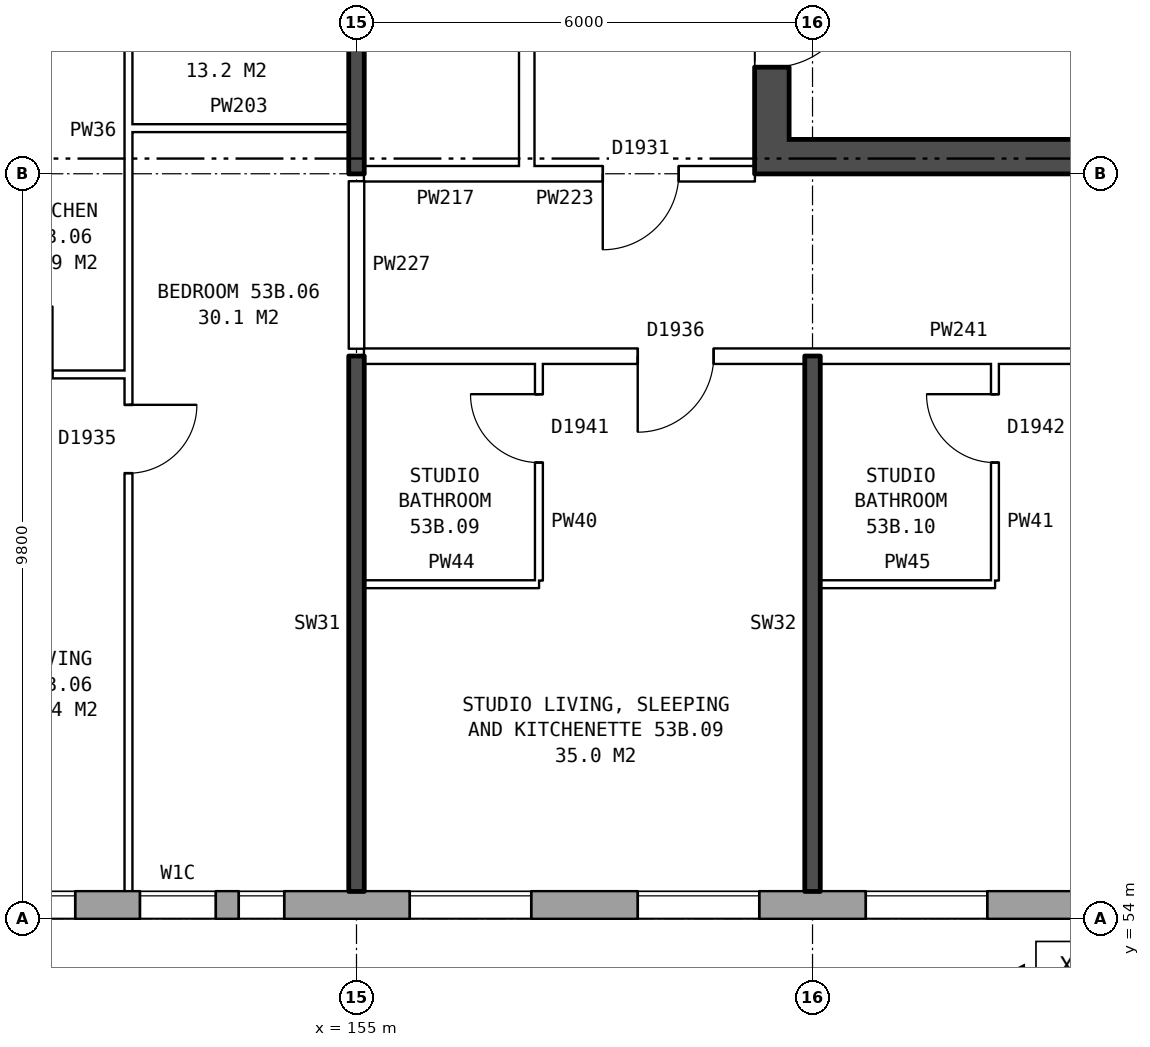
"""IFC4 building model, lengths in metres.
Left out: names, types, materials, properties, quantities, classifications, styles, units other than length and angle.
Written with IfcOpenShell. Run it as: python <this file> out.ifc"""

import sys

from ifc_helpers import new_model, si_unit, direction, frame, frame_2d, origin, place, context, subcontext, project, spatial, rectangle, extrude, element, fill, save


model = new_model("IFC4")
c1 = context("Model", 3, precision=1e-05, world=origin(), true_north=direction((0.0, 1.0)))
c2 = subcontext(c1, "Body", "Model", "MODEL_VIEW")
j1 = project(units=[si_unit("LENGTHUNIT", "METRE"), si_unit("PLANEANGLEUNIT", "RADIAN")], contexts=[c1])
p1 = place(None, origin())
s1 = spatial("IfcSite", under=j1, at=p1, CompositionType="ELEMENT")
p2 = place(p1, origin())
s2 = spatial("IfcBuilding", under=s1, at=p2, CompositionType="ELEMENT")
p3 = place(p2, frame((0.0, 0.0, 188.2)))
s3 = spatial("IfcBuildingStorey", under=s2, at=p3, CompositionType="ELEMENT", Elevation=188.2)
p4 = place(p3, frame((134.075, 54.18, 0.0), z_axis=(0.0, 0.0, 1.0), x_axis=(1.0, 0.0, 0.0)))
e1 = element("IfcWall", 1, at=p4, inside=s3, PredefinedType="STANDARD", context=c2, shape_type="SweptSolid", body=[
    extrude(rectangle(XDim=33.101, YDim=0.36, at=frame_2d((16.55, 0.0))), origin(), (0.0, 0.0, 1.0), 2.85),
])
p5 = place(p4, frame((0.625, 0.0, 0.8)))
e2 = element("IfcOpeningElement", 2, at=p5, cuts=e1, PredefinedType="OPENING", context=c2, shape_type="SweptSolid", body=[
    extrude(rectangle(XDim=1.6, YDim=1.8, at=frame_2d((0.8, 0.9))), frame((0.0, 0.19, 0.0), z_axis=(0.0, -1.0, 0.0), x_axis=(1.0, 0.0, 0.0)), (0.0, 0.0, 1.0), 0.38),
])
p6 = place(p4, frame((3.625, 0.0, 0.8)))
e3 = element("IfcOpeningElement", 3, at=p6, cuts=e1, PredefinedType="OPENING", context=c2, shape_type="SweptSolid", body=[
    extrude(rectangle(XDim=1.6, YDim=1.8, at=frame_2d((0.8, 0.9))), frame((0.0, 0.19, 0.0), z_axis=(0.0, -1.0, 0.0), x_axis=(1.0, 0.0, 0.0)), (0.0, 0.0, 1.0), 0.38),
])
p7 = place(p4, frame((6.625, 0.0, 0.8)))
e4 = element("IfcOpeningElement", 4, at=p7, cuts=e1, PredefinedType="OPENING", context=c2, shape_type="SweptSolid", body=[
    extrude(rectangle(XDim=1.6, YDim=1.8, at=frame_2d((0.8, 0.9))), frame((0.0, 0.19, 0.0), z_axis=(0.0, -1.0, 0.0), x_axis=(1.0, 0.0, 0.0)), (0.0, 0.0, 1.0), 0.38),
])
p8 = place(p4, frame((9.625, 0.0, 0.8)))
e5 = element("IfcOpeningElement", 5, at=p8, cuts=e1, PredefinedType="OPENING", context=c2, shape_type="SweptSolid", body=[
    extrude(rectangle(XDim=1.6, YDim=1.8, at=frame_2d((0.8, 0.9))), frame((0.0, 0.19, 0.0), z_axis=(0.0, -1.0, 0.0), x_axis=(1.0, 0.0, 0.0)), (0.0, 0.0, 1.0), 0.38),
])
p9 = place(p4, frame((12.975, 0.0, 0.15)))
e6 = element("IfcOpeningElement", 6, at=p9, cuts=e1, PredefinedType="OPENING", context=c2, shape_type="SweptSolid", body=[
    extrude(rectangle(XDim=0.6, YDim=0.9, at=frame_2d((0.3, 0.45))), frame((0.0, 0.19, 0.0), z_axis=(0.0, -1.0, 0.0), x_axis=(1.0, 0.0, 0.0)), (0.0, 0.0, 1.0), 0.38),
])
p10 = place(p4, frame((15.625, 0.0, 0.8)))
e7 = element("IfcOpeningElement", 7, at=p10, cuts=e1, PredefinedType="OPENING", context=c2, shape_type="SweptSolid", body=[
    extrude(rectangle(XDim=1.6, YDim=1.8, at=frame_2d((0.8, 0.9))), frame((0.0, 0.19, 0.0), z_axis=(0.0, -1.0, 0.0), x_axis=(1.0, 0.0, 0.0)), (0.0, 0.0, 1.0), 0.38),
])
p11 = place(p4, frame((18.075, 0.0, 0.45)))
e8 = element("IfcOpeningElement", 8, at=p11, cuts=e1, PredefinedType="OPENING", context=c2, shape_type="SweptSolid", body=[
    extrude(rectangle(XDim=1.0, YDim=1.8, at=frame_2d((0.5, 0.9))), frame((0.0, 0.19, 0.0), z_axis=(0.0, -1.0, 0.0), x_axis=(1.0, 0.0, 0.0)), (0.0, 0.0, 1.0), 0.38),
])
p12 = place(p4, frame((21.625, 0.0, 0.8)))
e9 = element("IfcOpeningElement", 9, at=p12, cuts=e1, PredefinedType="OPENING", context=c2, shape_type="SweptSolid", body=[
    extrude(rectangle(XDim=1.6, YDim=1.8, at=frame_2d((0.8, 0.9))), frame((0.0, 0.19, 0.0), z_axis=(0.0, -1.0, 0.0), x_axis=(1.0, 0.0, 0.0)), (0.0, 0.0, 1.0), 0.38),
])
p13 = place(p4, frame((24.625, 0.0, 0.8)))
e10 = element("IfcOpeningElement", 10, at=p13, cuts=e1, PredefinedType="OPENING", context=c2, shape_type="SweptSolid", body=[
    extrude(rectangle(XDim=1.6, YDim=1.8, at=frame_2d((0.8, 0.9))), frame((0.0, 0.19, 0.0), z_axis=(0.0, -1.0, 0.0), x_axis=(1.0, 0.0, 0.0)), (0.0, 0.0, 1.0), 0.38),
])
p14 = place(p4, frame((27.625, 0.0, 0.8)))
e11 = element("IfcOpeningElement", 11, at=p14, cuts=e1, PredefinedType="OPENING", context=c2, shape_type="SweptSolid", body=[
    extrude(rectangle(XDim=1.6, YDim=1.8, at=frame_2d((0.8, 0.9))), frame((0.0, 0.19, 0.0), z_axis=(0.0, -1.0, 0.0), x_axis=(1.0, 0.0, 0.0)), (0.0, 0.0, 1.0), 0.38),
])
p15 = place(p4, frame((30.625, 0.0, 0.8)))
e12 = element("IfcOpeningElement", 12, at=p15, cuts=e1, PredefinedType="OPENING", context=c2, shape_type="SweptSolid", body=[
    extrude(rectangle(XDim=1.6, YDim=1.8, at=frame_2d((0.8, 0.9))), frame((0.0, 0.19, 0.0), z_axis=(0.0, -1.0, 0.0), x_axis=(1.0, 0.0, 0.0)), (0.0, 0.0, 1.0), 0.38),
])
p16 = place(p4, frame((13.875, 0.0, 0.25)))
e13 = element("IfcOpeningElement", 13, at=p16, cuts=e1, PredefinedType="OPENING", context=c2, shape_type="SweptSolid", body=[
    extrude(rectangle(XDim=0.8, YDim=1.8, at=frame_2d((0.4, 0.9))), frame((0.0, 0.19, 0.0), z_axis=(0.0, -1.0, 0.0), x_axis=(1.0, 0.0, 0.0)), (0.0, 0.0, 1.0), 0.38),
])
p17 = place(p4, frame((19.375, 0.0, 0.35)))
e14 = element("IfcOpeningElement", 14, at=p17, cuts=e1, PredefinedType="OPENING", context=c2, shape_type="SweptSolid", body=[
    extrude(rectangle(XDim=0.6, YDim=0.9, at=frame_2d((0.3, 0.45))), frame((0.0, 0.19, 0.0), z_axis=(0.0, -1.0, 0.0), x_axis=(1.0, 0.0, 0.0)), (0.0, 0.0, 1.0), 0.38),
])
p18 = place(p3, frame((160.465, 76.2, 0.0), z_axis=(0.0, 0.0, 1.0), x_axis=(0.0, -1.0, 0.0)))
e15 = element("IfcWall", 15, at=p18, inside=s3, PredefinedType="SHEAR", context=c2, shape_type="SweptSolid", body=[
    extrude(rectangle(XDim=12.4, YDim=0.45, at=frame_2d((6.2, 0.0))), origin(), (0.0, 0.0, 1.0), 2.85),
])
p19 = place(p18, frame((1.325, 0.0, 0.0)))
e16 = element("IfcOpeningElement", 16, at=p19, cuts=e15, PredefinedType="OPENING", context=c2, shape_type="SweptSolid", body=[
    extrude(rectangle(XDim=1.1, YDim=2.1, at=frame_2d((0.55, 1.05))), frame((0.0, 0.235, 0.0), z_axis=(0.0, -1.0, 0.0), x_axis=(1.0, 0.0, 0.0)), (0.0, 0.0, 1.0), 0.47),
])
p20 = place(p18, frame((3.825, 0.0, 0.0)))
e17 = element("IfcOpeningElement", 17, at=p20, cuts=e15, PredefinedType="OPENING", context=c2, shape_type="SweptSolid", body=[
    extrude(rectangle(XDim=0.85, YDim=2.1, at=frame_2d((0.425, 1.05))), frame((0.0, 0.235, 0.0), z_axis=(0.0, -1.0, 0.0), x_axis=(1.0, 0.0, 0.0)), (0.0, 0.0, 1.0), 0.47),
])
p21 = place(p18, frame((5.975, 0.0, 0.0)))
e18 = element("IfcOpeningElement", 18, at=p21, cuts=e15, PredefinedType="OPENING", context=c2, shape_type="SweptSolid", body=[
    extrude(rectangle(XDim=0.85, YDim=2.1, at=frame_2d((0.425, 1.05))), frame((0.0, 0.235, 0.0), z_axis=(0.0, -1.0, 0.0), x_axis=(1.0, 0.0, 0.0)), (0.0, 0.0, 1.0), 0.47),
])
p22 = place(p18, frame((9.9, 0.0, 0.0)))
e19 = element("IfcOpeningElement", 19, at=p22, cuts=e15, PredefinedType="OPENING", context=c2, shape_type="SweptSolid", body=[
    extrude(rectangle(XDim=1.1, YDim=2.1, at=frame_2d((0.55, 1.05))), frame((0.0, 0.235, 0.0), z_axis=(0.0, -1.0, 0.0), x_axis=(1.0, 0.0, 0.0)), (0.0, 0.0, 1.0), 0.47),
])
p23 = place(p18, frame((8.125, 0.0, 0.0)))
e20 = element("IfcOpeningElement", 20, at=p23, cuts=e15, PredefinedType="OPENING", context=c2, shape_type="SweptSolid", body=[
    extrude(rectangle(XDim=0.85, YDim=2.1, at=frame_2d((0.425, 1.05))), frame((0.0, 0.235, 0.0), z_axis=(0.0, -1.0, 0.0), x_axis=(1.0, 0.0, 0.0)), (0.0, 0.0, 1.0), 0.47),
])
p24 = place(p3, frame((160.69, 64.025, 0.0), z_axis=(0.0, 0.0, 1.0), x_axis=(1.0, 0.0, 0.0)))
e21 = element("IfcWall", 21, at=p24, inside=s3, PredefinedType="SHEAR", context=c2, shape_type="SweptSolid", body=[
    extrude(rectangle(XDim=7.5, YDim=0.45, at=frame_2d((3.75, 0.0))), origin(), (0.0, 0.0, 1.0), 2.85),
])
p25 = place(p3, frame((157.24, 63.9, 0.0), z_axis=(0.0, 0.0, 1.0), x_axis=(0.0, 1.0, 0.0)))
e22 = element("IfcWall", 22, at=p25, inside=s3, PredefinedType="PARTITIONING", context=c2, shape_type="SweptSolid", body=[
    extrude(rectangle(XDim=12.2, YDim=0.2, at=frame_2d((6.1, 0.0))), origin(), (0.0, 0.0, 1.0), 2.85),
])
p26 = place(p25, frame((5.1, 0.0, 0.0)))
e23 = element("IfcOpeningElement", 23, at=p26, cuts=e22, PredefinedType="OPENING", context=c2, shape_type="SweptSolid", body=[
    extrude(rectangle(XDim=2.0, YDim=2.1, at=frame_2d((1.0, 1.05))), frame((0.0, 0.11, 0.0), z_axis=(0.0, -1.0, 0.0), x_axis=(1.0, 0.0, 0.0)), (0.0, 0.0, 1.0), 0.22),
])
for number, where, z_axis, x_axis in (
    (24, (155.1, 58.4, 0.0), (0.0, 0.0, 1.0), (1.0, 0.0, 0.0)),
    (25, (161.1, 58.4, 0.0), (0.0, 0.0, 1.0), (1.0, 0.0, 0.0)),
):
    element("IfcWall", number, at=place(p3, frame(where, z_axis=z_axis, x_axis=x_axis)), inside=s3, PredefinedType="PARTITIONING", context=c2, shape_type="SweptSolid", body=[
        extrude(rectangle(XDim=2.3, YDim=0.1, at=frame_2d((1.15, 0.0))), origin(), (0.0, 0.0, 1.0), 2.85),
    ])
p27 = place(p3, frame((149.1, 61.16, 0.0), z_axis=(0.0, 0.0, 1.0), x_axis=(1.0, 0.0, 0.0)))
e26 = element("IfcWall", 26, at=p27, inside=s3, PredefinedType="PARTITIONING", context=c2, shape_type="SweptSolid", body=[
    extrude(rectangle(XDim=2.9, YDim=0.1, at=frame_2d((1.45, 0.0))), origin(), (0.0, 0.0, 1.0), 2.85),
])
p28 = place(p27, frame((1.0, 0.0, 0.0)))
e27 = element("IfcOpeningElement", 27, at=p28, cuts=e26, PredefinedType="OPENING", context=c2, shape_type="SweptSolid", body=[
    extrude(rectangle(XDim=0.9, YDim=2.1, at=frame_2d((0.45, 1.05))), frame((0.0, 0.06, 0.0), z_axis=(0.0, -1.0, 0.0), x_axis=(1.0, 0.0, 0.0)), (0.0, 0.0, 1.0), 0.12),
])
p29 = place(p3, frame((155.1, 61.4, 0.0), z_axis=(0.0, 0.0, 1.0), x_axis=(1.0, 0.0, 0.0)))
e28 = element("IfcWall", 28, at=p29, inside=s3, PredefinedType="PARTITIONING", context=c2, shape_type="SweptSolid", body=[
    extrude(rectangle(XDim=14.79, YDim=0.2, at=frame_2d((7.395, 0.0))), origin(), (0.0, 0.0, 1.0), 2.85),
])
p30 = place(p29, frame((3.6, 0.0, 0.0)))
e29 = element("IfcOpeningElement", 29, at=p30, cuts=e28, PredefinedType="OPENING", context=c2, shape_type="SweptSolid", body=[
    extrude(rectangle(XDim=1.0, YDim=2.1, at=frame_2d((0.5, 1.05))), frame((0.0, 0.11, 0.0), z_axis=(0.0, -1.0, 0.0), x_axis=(1.0, 0.0, 0.0)), (0.0, 0.0, 1.0), 0.22),
])
p31 = place(p29, frame((11.045, 0.0, 0.0)))
e30 = element("IfcOpeningElement", 30, at=p31, cuts=e28, PredefinedType="OPENING", context=c2, shape_type="SweptSolid", body=[
    extrude(rectangle(XDim=1.0, YDim=2.1, at=frame_2d((0.5, 1.05))), frame((0.0, 0.11, 0.0), z_axis=(0.0, -1.0, 0.0), x_axis=(1.0, 0.0, 0.0)), (0.0, 0.0, 1.0), 0.22),
])
p32 = place(p3, frame((155.1, 63.8, 0.0), z_axis=(0.0, 0.0, 1.0), x_axis=(1.0, 0.0, 0.0)))
e31 = element("IfcWall", 31, at=p32, inside=s3, PredefinedType="PARTITIONING", context=c2, shape_type="SweptSolid", body=[
    extrude(rectangle(XDim=2.14, YDim=0.2, at=frame_2d((1.07, 0.0))), origin(), (0.0, 0.0, 1.0), 2.85),
])
p33 = place(p3, frame((157.24, 63.8, 0.0), z_axis=(0.0, 0.0, 1.0), x_axis=(1.0, 0.0, 0.0)))
e32 = element("IfcWall", 32, at=p33, inside=s3, PredefinedType="PARTITIONING", context=c2, shape_type="SweptSolid", body=[
    extrude(rectangle(XDim=3.0, YDim=0.2, at=frame_2d((1.5, 0.0))), origin(), (0.0, 0.0, 1.0), 2.85),
])
p34 = place(p33, frame((1.0, 0.0, 0.0)))
e33 = element("IfcOpeningElement", 33, at=p34, cuts=e32, PredefinedType="OPENING", context=c2, shape_type="SweptSolid", body=[
    extrude(rectangle(XDim=1.0, YDim=2.1, at=frame_2d((0.5, 1.05))), frame((0.0, 0.11, 0.0), z_axis=(0.0, -1.0, 0.0), x_axis=(1.0, 0.0, 0.0)), (0.0, 0.0, 1.0), 0.22),
])
p35 = place(p3, frame((152.0, 64.4, 0.0), z_axis=(0.0, 0.0, 1.0), x_axis=(1.0, 0.0, 0.0)))
e34 = element("IfcWall", 34, at=p35, inside=s3, PredefinedType="PARTITIONING", context=c2, shape_type="SweptSolid", body=[
    extrude(rectangle(XDim=2.9, YDim=0.1, at=frame_2d((1.45, 0.0))), origin(), (0.0, 0.0, 1.0), 2.85),
])
p36 = place(p3, frame((152.0, 54.36, 0.0), z_axis=(0.0, 0.0, 1.0), x_axis=(0.0, 1.0, 0.0)))
e35 = element("IfcWall", 35, at=p36, inside=s3, PredefinedType="PARTITIONING", context=c2, shape_type="SweptSolid", body=[
    extrude(rectangle(XDim=14.34, YDim=0.1, at=frame_2d((7.17, 0.0))), origin(), (0.0, 0.0, 1.0), 2.85),
])
p37 = place(p36, frame((5.5, 0.0, 0.0)))
e36 = element("IfcOpeningElement", 36, at=p37, cuts=e35, PredefinedType="OPENING", context=c2, shape_type="SweptSolid", body=[
    extrude(rectangle(XDim=0.9, YDim=2.1, at=frame_2d((0.45, 1.05))), frame((0.0, 0.06, 0.0), z_axis=(0.0, -1.0, 0.0), x_axis=(1.0, 0.0, 0.0)), (0.0, 0.0, 1.0), 0.12),
])
p38 = place(p36, frame((13.04, 0.0, 0.0)))
e37 = element("IfcOpeningElement", 37, at=p38, cuts=e35, PredefinedType="OPENING", context=c2, shape_type="SweptSolid", body=[
    extrude(rectangle(XDim=0.9, YDim=2.1, at=frame_2d((0.45, 1.05))), frame((0.0, 0.06, 0.0), z_axis=(0.0, -1.0, 0.0), x_axis=(1.0, 0.0, 0.0)), (0.0, 0.0, 1.0), 0.12),
])
p39 = place(p3, frame((155.0, 54.36, 0.0), z_axis=(0.0, 0.0, 1.0), x_axis=(0.0, 1.0, 0.0)))
e38 = element("IfcWall", 38, at=p39, inside=s3, PredefinedType="SOLIDWALL", context=c2, shape_type="SweptSolid", body=[
    extrude(rectangle(XDim=7.04, YDim=0.2, at=frame_2d((3.52, 0.0))), origin(), (0.0, 0.0, 1.0), 2.85),
])
p40 = place(p3, frame((155.0, 61.5, 0.0), z_axis=(0.0, 0.0, 1.0), x_axis=(0.0, 1.0, 0.0)))
e39 = element("IfcWall", 39, at=p40, inside=s3, PredefinedType="PARTITIONING", context=c2, shape_type="SweptSolid", body=[
    extrude(rectangle(XDim=2.2, YDim=0.2, at=frame_2d((1.1, 0.0))), origin(), (0.0, 0.0, 1.0), 2.85),
])
p41 = place(p3, frame((155.0, 63.8, 0.0), z_axis=(0.0, 0.0, 1.0), x_axis=(0.0, 1.0, 0.0)))
e40 = element("IfcWall", 40, at=p41, inside=s3, PredefinedType="SOLIDWALL", context=c2, shape_type="SweptSolid", body=[
    extrude(rectangle(XDim=5.0, YDim=0.2, at=frame_2d((2.5, 0.0))), origin(), (0.0, 0.0, 1.0), 2.85),
])
p42 = place(p3, frame((157.4, 58.45, 0.0), z_axis=(0.0, 0.0, 1.0), x_axis=(0.0, 1.0, 0.0)))
e41 = element("IfcWall", 41, at=p42, inside=s3, PredefinedType="PARTITIONING", context=c2, shape_type="SweptSolid", body=[
    extrude(rectangle(XDim=2.85, YDim=0.1, at=frame_2d((1.425, 0.0))), origin(), (0.0, 0.0, 1.0), 2.85),
])
p43 = place(p42, frame((1.55, 0.0, 0.0)))
e42 = element("IfcOpeningElement", 42, at=p43, cuts=e41, PredefinedType="OPENING", context=c2, shape_type="SweptSolid", body=[
    extrude(rectangle(XDim=0.9, YDim=2.1, at=frame_2d((0.45, 1.05))), frame((0.0, 0.06, 0.0), z_axis=(0.0, -1.0, 0.0), x_axis=(1.0, 0.0, 0.0)), (0.0, 0.0, 1.0), 0.12),
])
p44 = place(p3, frame((161.0, 54.36, 0.0), z_axis=(0.0, 0.0, 1.0), x_axis=(0.0, 1.0, 0.0)))
e43 = element("IfcWall", 43, at=p44, inside=s3, PredefinedType="SOLIDWALL", context=c2, shape_type="SweptSolid", body=[
    extrude(rectangle(XDim=7.04, YDim=0.2, at=frame_2d((3.52, 0.0))), origin(), (0.0, 0.0, 1.0), 2.85),
])
p45 = place(p3, frame((163.4, 58.45, 0.0), z_axis=(0.0, 0.0, 1.0), x_axis=(0.0, 1.0, 0.0)))
e44 = element("IfcWall", 44, at=p45, inside=s3, PredefinedType="PARTITIONING", context=c2, shape_type="SweptSolid", body=[
    extrude(rectangle(XDim=2.85, YDim=0.1, at=frame_2d((1.425, 0.0))), origin(), (0.0, 0.0, 1.0), 2.85),
])
p46 = place(p45, frame((1.55, 0.0, 0.0)))
e45 = element("IfcOpeningElement", 45, at=p46, cuts=e44, PredefinedType="OPENING", context=c2, shape_type="SweptSolid", body=[
    extrude(rectangle(XDim=0.9, YDim=2.1, at=frame_2d((0.45, 1.05))), frame((0.0, 0.06, 0.0), z_axis=(0.0, -1.0, 0.0), x_axis=(1.0, 0.0, 0.0)), (0.0, 0.0, 1.0), 0.12),
])
p47 = place(p10, origin())
e46 = element("IfcWindow", 46, at=p47, inside=s3, PartitioningType="SINGLE_PANEL", PredefinedType="WINDOW", context=c2, shape_type="SweptSolid", body=[
    extrude(rectangle(XDim=1.6, YDim=1.8, at=frame_2d((0.8, 0.9))), frame((0.0, 0.15, 0.0), z_axis=(0.0, -1.0, 0.0), x_axis=(1.0, 0.0, 0.0)), (0.0, 0.0, 1.0), 0.06),
])
fill(e7, e46)
p48 = place(p11, origin())
e47 = element("IfcWindow", 47, at=p48, inside=s3, PartitioningType="SINGLE_PANEL", PredefinedType="WINDOW", context=c2, shape_type="SweptSolid", body=[
    extrude(rectangle(XDim=1.0, YDim=1.8, at=frame_2d((0.5, 0.9))), frame((0.0, 0.15, 0.0), z_axis=(0.0, -1.0, 0.0), x_axis=(1.0, 0.0, 0.0)), (0.0, 0.0, 1.0), 0.06),
])
fill(e8, e47)
p49 = place(p12, origin())
e48 = element("IfcWindow", 48, at=p49, inside=s3, PartitioningType="SINGLE_PANEL", PredefinedType="WINDOW", context=c2, shape_type="SweptSolid", body=[
    extrude(rectangle(XDim=1.6, YDim=1.8, at=frame_2d((0.8, 0.9))), frame((0.0, 0.15, 0.0), z_axis=(0.0, -1.0, 0.0), x_axis=(1.0, 0.0, 0.0)), (0.0, 0.0, 1.0), 0.06),
])
fill(e9, e48)
p50 = place(p13, origin())
e49 = element("IfcWindow", 49, at=p50, inside=s3, PartitioningType="SINGLE_PANEL", PredefinedType="WINDOW", context=c2, shape_type="SweptSolid", body=[
    extrude(rectangle(XDim=1.6, YDim=1.8, at=frame_2d((0.8, 0.9))), frame((0.0, 0.15, 0.0), z_axis=(0.0, -1.0, 0.0), x_axis=(1.0, 0.0, 0.0)), (0.0, 0.0, 1.0), 0.06),
])
fill(e10, e49)
p51 = place(p14, origin())
e50 = element("IfcWindow", 50, at=p51, inside=s3, PartitioningType="SINGLE_PANEL", PredefinedType="WINDOW", context=c2, shape_type="SweptSolid", body=[
    extrude(rectangle(XDim=1.6, YDim=1.8, at=frame_2d((0.8, 0.9))), frame((0.0, 0.15, 0.0), z_axis=(0.0, -1.0, 0.0), x_axis=(1.0, 0.0, 0.0)), (0.0, 0.0, 1.0), 0.06),
])
fill(e11, e50)
p52 = place(p22, origin())
e51 = element("IfcDoor", 51, at=p52, inside=s3, OperationType="SINGLE_SWING_LEFT", PredefinedType="DOOR", context=c2, shape_type="SweptSolid", body=[
    extrude(rectangle(XDim=1.1, YDim=2.1, at=frame_2d((0.55, 1.05))), frame((0.0, 0.21, 0.0), z_axis=(0.0, -1.0, 0.0), x_axis=(1.0, 0.0, 0.0)), (0.0, 0.0, 1.0), 0.05),
])
fill(e19, e51)
p53 = place(p34, frame((1.0, 0.0, 0.0), z_axis=(0.0, 0.0, 1.0), x_axis=(-1.0, 0.0, 0.0)))
e52 = element("IfcDoor", 52, at=p53, inside=s3, OperationType="SINGLE_SWING_RIGHT", PredefinedType="DOOR", context=c2, shape_type="SweptSolid", body=[
    extrude(rectangle(XDim=1.0, YDim=2.1, at=frame_2d((0.5, 1.05))), frame((0.0, 0.025, 0.0), z_axis=(0.0, -1.0, 0.0), x_axis=(1.0, 0.0, 0.0)), (0.0, 0.0, 1.0), 0.05),
])
fill(e33, e52)
p54 = place(p37, frame((0.9, 0.0, 0.0), z_axis=(0.0, 0.0, 1.0), x_axis=(-1.0, 0.0, 0.0)))
e53 = element("IfcDoor", 53, at=p54, inside=s3, OperationType="SINGLE_SWING_LEFT", PredefinedType="DOOR", context=c2, shape_type="SweptSolid", body=[
    extrude(rectangle(XDim=0.9, YDim=2.1, at=frame_2d((0.45, 1.05))), frame((0.0, 0.025, 0.0), z_axis=(0.0, -1.0, 0.0), x_axis=(1.0, 0.0, 0.0)), (0.0, 0.0, 1.0), 0.05),
])
fill(e36, e53)
p55 = place(p30, frame((1.0, 0.0, 0.0), z_axis=(0.0, 0.0, 1.0), x_axis=(-1.0, 0.0, 0.0)))
e54 = element("IfcDoor", 54, at=p55, inside=s3, OperationType="SINGLE_SWING_RIGHT", PredefinedType="DOOR", context=c2, shape_type="SweptSolid", body=[
    extrude(rectangle(XDim=1.0, YDim=2.1, at=frame_2d((0.5, 1.05))), frame((0.0, 0.025, 0.0), z_axis=(0.0, -1.0, 0.0), x_axis=(1.0, 0.0, 0.0)), (0.0, 0.0, 1.0), 0.05),
])
fill(e29, e54)
p56 = place(p43, origin())
e55 = element("IfcDoor", 55, at=p56, inside=s3, OperationType="SINGLE_SWING_RIGHT", PredefinedType="DOOR", context=c2, shape_type="SweptSolid", body=[
    extrude(rectangle(XDim=0.9, YDim=2.1, at=frame_2d((0.45, 1.05))), frame((0.0, 0.025, 0.0), z_axis=(0.0, -1.0, 0.0), x_axis=(1.0, 0.0, 0.0)), (0.0, 0.0, 1.0), 0.05),
])
fill(e42, e55)
p57 = place(p46, origin())
e56 = element("IfcDoor", 56, at=p57, inside=s3, OperationType="SINGLE_SWING_RIGHT", PredefinedType="DOOR", context=c2, shape_type="SweptSolid", body=[
    extrude(rectangle(XDim=0.9, YDim=2.1, at=frame_2d((0.45, 1.05))), frame((0.0, 0.025, 0.0), z_axis=(0.0, -1.0, 0.0), x_axis=(1.0, 0.0, 0.0)), (0.0, 0.0, 1.0), 0.05),
])
fill(e45, e56)
p58 = place(p17, origin())
e57 = element("IfcWindow", 57, at=p58, inside=s3, PartitioningType="SINGLE_PANEL", PredefinedType="WINDOW", context=c2, shape_type="SweptSolid", body=[
    extrude(rectangle(XDim=0.6, YDim=0.9, at=frame_2d((0.3, 0.45))), frame((0.0, 0.15, 0.0), z_axis=(0.0, -1.0, 0.0), x_axis=(1.0, 0.0, 0.0)), (0.0, 0.0, 1.0), 0.06),
])
fill(e14, e57)
save(model, sys.argv[1])
